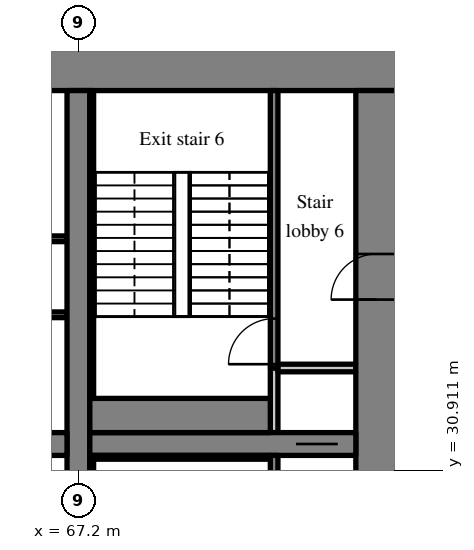
"""IFC4 building model, lengths in metres.
Left out: names, types, materials, properties, quantities, classifications, styles, units other than length and angle.
Written with IfcOpenShell. Run it as: python <this file> out.ifc"""

import sys

from ifc_helpers import new_model, si_unit, direction, frame, frame_2d, origin, place, context, subcontext, project, spatial, rectangle, extrude, source, transform, mapped, element, fill, save


model = new_model("IFC4")
c1 = context("Model", 3, precision=1e-05, world=origin(), true_north=direction((0.0, 1.0)))
c2 = subcontext(c1, "Body", "Model", "MODEL_VIEW")
j1 = project(units=[si_unit("LENGTHUNIT", "METRE"), si_unit("PLANEANGLEUNIT", "RADIAN")], contexts=[c1])
p1 = place(None, origin())
s1 = spatial("IfcSite", under=j1, at=p1, CompositionType="ELEMENT")
p2 = place(p1, origin())
s2 = spatial("IfcBuilding", under=s1, at=p2, CompositionType="ELEMENT")
p3 = place(p2, frame((0.0, 0.0, 27.8)))
s3 = spatial("IfcBuildingStorey", under=s2, at=p3, CompositionType="ELEMENT", Elevation=27.8)
m1 = source(origin(), c2, "Body", "SweptSolid", [
    extrude(rectangle(XDim=50.4, YDim=1.1, at=frame_2d((25.2, 0.0))), origin(), (0.0, 0.0, 1.0), 3.52),
])
p4 = place(p3, frame((25.2, 41.45, 0.0), z_axis=(0.0, 0.0, 1.0), x_axis=(1.0, 0.0, 0.0)))
e1 = element("IfcWall", 1, at=p4, inside=s3, PredefinedType="SHEAR", context=c2, shape_type="MappedRepresentation", body=[
    mapped(m1, transform((0.0, 0.0, 0.0), scale=1.0)),
])
m2 = source(origin(), c2, "Body", "SweptSolid", [
    extrude(rectangle(XDim=17.8, YDim=1.1, at=frame_2d((8.9, 0.0))), origin(), (0.0, 0.0, 1.0), 3.52),
])
p5 = place(p3, frame((75.05, 23.1, 0.0), z_axis=(0.0, 0.0, 1.0), x_axis=(0.0, 1.0, 0.0)))
e2 = element("IfcWall", 2, at=p5, inside=s3, PredefinedType="SHEAR", context=c2, shape_type="MappedRepresentation", body=[
    mapped(m2, transform((0.0, 0.0, 0.0), scale=1.0)),
])
m3 = source(origin(), c2, "Body", "SweptSolid", [
    extrude(rectangle(XDim=1.0, YDim=2.1, at=frame_2d((0.5, 1.05))), frame((0.0, 0.56, 0.0), z_axis=(0.0, -1.0, 0.0), x_axis=(1.0, 0.0, 0.0)), (0.0, 0.0, 1.0), 1.12),
])
p6 = place(p5, frame((2.4, 0.0, 0.0)))
e3 = element("IfcOpeningElement", 3, at=p6, cuts=e2, PredefinedType="OPENING", context=c2, shape_type="MappedRepresentation", body=[
    mapped(m3, transform((0.0, 0.0, 0.0), scale=1.0)),
])
m4 = source(origin(), c2, "Body", "SweptSolid", [
    extrude(rectangle(XDim=1.2, YDim=2.1, at=frame_2d((0.6, 1.05))), frame((0.0, 0.56, 0.0), z_axis=(0.0, -1.0, 0.0), x_axis=(1.0, 0.0, 0.0)), (0.0, 0.0, 1.0), 1.12),
])
p7 = place(p5, frame((12.3, 0.0, 0.0)))
e4 = element("IfcOpeningElement", 4, at=p7, cuts=e2, PredefinedType="OPENING", context=c2, shape_type="MappedRepresentation", body=[
    mapped(m4, transform((0.0, 0.0, 0.0), scale=1.0)),
])
m5 = source(origin(), c2, "Body", "SweptSolid", [
    extrude(rectangle(XDim=17.8, YDim=0.6, at=frame_2d((8.9, 0.0))), origin(), (0.0, 0.0, 1.0), 3.52),
])
p8 = place(p3, frame((67.2, 23.1, 0.0), z_axis=(0.0, 0.0, 1.0), x_axis=(0.0, 1.0, 0.0)))
e5 = element("IfcWall", 5, at=p8, inside=s3, PredefinedType="SHEAR", context=c2, shape_type="MappedRepresentation", body=[
    mapped(m5, transform((0.0, 0.0, 0.0), scale=1.0)),
])
m6 = source(origin(), c2, "Body", "SweptSolid", [
    extrude(rectangle(XDim=16.2, YDim=0.6, at=frame_2d((8.1, 0.0))), origin(), (0.0, 0.0, 1.0), 3.52),
])
p9 = place(p3, frame((50.7, 31.6, 0.0), z_axis=(0.0, 0.0, 1.0), x_axis=(1.0, 0.0, 0.0)))
e6 = element("IfcWall", 6, at=p9, inside=s3, PredefinedType="SHEAR", context=c2, shape_type="MappedRepresentation", body=[
    mapped(m6, transform((0.0, 0.0, 0.0), scale=1.0)),
])
m7 = source(origin(), c2, "Body", "SweptSolid", [
    extrude(rectangle(XDim=1.0, YDim=2.1, at=frame_2d((0.5, 1.05))), frame((0.0, 0.31, 0.0), z_axis=(0.0, -1.0, 0.0), x_axis=(1.0, 0.0, 0.0)), (0.0, 0.0, 1.0), 0.62),
])
p10 = place(p9, frame((0.55, 0.0, 0.0)))
e7 = element("IfcOpeningElement", 7, at=p10, cuts=e6, PredefinedType="OPENING", context=c2, shape_type="MappedRepresentation", body=[
    mapped(m7, transform((0.0, 0.0, 0.0), scale=1.0)),
])
m8 = source(origin(), c2, "Body", "SweptSolid", [
    extrude(rectangle(XDim=7.0, YDim=0.6, at=frame_2d((3.5, 0.0))), origin(), (0.0, 0.0, 1.0), 3.52),
])
p11 = place(p3, frame((67.5, 31.6, 0.0), z_axis=(0.0, 0.0, 1.0), x_axis=(1.0, 0.0, 0.0)))
e8 = element("IfcWall", 8, at=p11, inside=s3, PredefinedType="SHEAR", context=c2, shape_type="MappedRepresentation", body=[
    mapped(m8, transform((0.0, 0.0, 0.0), scale=1.0)),
])
m9 = source(origin(), c2, "Body", "SweptSolid", [
    extrude(rectangle(XDim=1.1, YDim=2.1, at=frame_2d((0.55, 1.05))), frame((0.0, 0.31, 0.0), z_axis=(0.0, -1.0, 0.0), x_axis=(1.0, 0.0, 0.0)), (0.0, 0.0, 1.0), 0.62),
])
p12 = place(p11, frame((5.425, 0.0, 0.0)))
e9 = element("IfcOpeningElement", 9, at=p12, cuts=e8, PredefinedType="OPENING", context=c2, shape_type="MappedRepresentation", body=[
    mapped(m9, transform((0.0, 0.0, 0.0), scale=1.0)),
])
m10 = source(origin(), c2, "Body", "SweptSolid", [
    extrude(rectangle(XDim=14.1, YDim=0.15, at=frame_2d((7.05, 0.0))), origin(), (0.0, 0.0, 1.0), 3.52),
])
p13 = place(p3, frame((66.9, 35.0, 0.0), z_axis=(0.0, 0.0, 1.0), x_axis=(-1.0, 0.0, 0.0)))
e10 = element("IfcWall", 10, at=p13, inside=s3, PredefinedType="PARTITIONING", context=c2, shape_type="MappedRepresentation", body=[
    mapped(m10, transform((0.0, 0.0, 0.0), scale=1.0)),
])
m11 = source(origin(), c2, "Body", "SweptSolid", [
    extrude(rectangle(XDim=0.9, YDim=2.1, at=frame_2d((0.45, 1.05))), frame((0.0, 0.085, 0.0), z_axis=(0.0, -1.0, 0.0), x_axis=(1.0, 0.0, 0.0)), (0.0, 0.0, 1.0), 0.17),
])
p14 = place(p13, frame((6.562, 0.0, 0.0)))
e11 = element("IfcOpeningElement", 11, at=p14, cuts=e10, PredefinedType="OPENING", context=c2, shape_type="MappedRepresentation", body=[
    mapped(m11, transform((0.0, 0.0, 0.0), scale=1.0)),
])
m12 = source(origin(), c2, "Body", "SweptSolid", [
    extrude(rectangle(XDim=16.2, YDim=0.15, at=frame_2d((8.1, 0.0))), origin(), (0.0, 0.0, 1.0), 3.52),
])
p15 = place(p3, frame((66.9, 37.0, 0.0), z_axis=(0.0, 0.0, 1.0), x_axis=(-1.0, 0.0, 0.0)))
e12 = element("IfcWall", 12, at=p15, inside=s3, PredefinedType="PARTITIONING", context=c2, shape_type="MappedRepresentation", body=[
    mapped(m12, transform((0.0, 0.0, 0.0), scale=1.0)),
])
p16 = place(p15, frame((3.195, 0.0, 0.0)))
e13 = element("IfcOpeningElement", 13, at=p16, cuts=e12, PredefinedType="OPENING", context=c2, shape_type="MappedRepresentation", body=[
    mapped(m11, transform((0.0, 0.0, 0.0), scale=1.0)),
])
p17 = place(p15, frame((8.055, 0.0, 0.0)))
e14 = element("IfcOpeningElement", 14, at=p17, cuts=e12, PredefinedType="OPENING", context=c2, shape_type="MappedRepresentation", body=[
    mapped(m11, transform((0.0, 0.0, 0.0), scale=1.0)),
])
p18 = place(p15, frame((11.295, 0.0, 0.0)))
e15 = element("IfcOpeningElement", 15, at=p18, cuts=e12, PredefinedType="OPENING", context=c2, shape_type="MappedRepresentation", body=[
    mapped(m11, transform((0.0, 0.0, 0.0), scale=1.0)),
])
p19 = place(p15, frame((14.535, 0.0, 0.0)))
e16 = element("IfcOpeningElement", 16, at=p19, cuts=e12, PredefinedType="OPENING", context=c2, shape_type="MappedRepresentation", body=[
    mapped(m11, transform((0.0, 0.0, 0.0), scale=1.0)),
])
m13 = source(origin(), c2, "Body", "SweptSolid", [
    extrude(rectangle(XDim=8.2, YDim=0.2, at=frame_2d((4.1, 0.0))), origin(), (0.0, 0.0, 1.0), 3.52),
])
p20 = place(p3, frame((72.35, 23.1, 0.0), z_axis=(0.0, 0.0, 1.0), x_axis=(0.0, 1.0, 0.0)))
e17 = element("IfcWall", 17, at=p20, inside=s3, PredefinedType="SOLIDWALL", context=c2, shape_type="MappedRepresentation", body=[
    mapped(m13, transform((0.0, 0.0, 0.0), scale=1.0)),
])
m14 = source(origin(), c2, "Body", "SweptSolid", [
    extrude(rectangle(XDim=1.2, YDim=2.1, at=frame_2d((0.6, 1.05))), frame((0.0, 0.11, 0.0), z_axis=(0.0, -1.0, 0.0), x_axis=(1.0, 0.0, 0.0)), (0.0, 0.0, 1.0), 0.22),
])
p21 = place(p20, frame((0.5, 0.0, 0.0)))
e18 = element("IfcOpeningElement", 18, at=p21, cuts=e17, PredefinedType="OPENING", context=c2, shape_type="MappedRepresentation", body=[
    mapped(m14, transform((0.0, 0.0, 0.0), scale=1.0)),
])
m15 = source(origin(), c2, "Body", "SweptSolid", [
    extrude(rectangle(XDim=1.7, YDim=0.2, at=frame_2d((0.85, 0.0))), origin(), (0.0, 0.0, 1.0), 3.52),
])
p22 = place(p3, frame((72.35, 31.9, 0.0), z_axis=(0.0, 0.0, 1.0), x_axis=(0.0, 1.0, 0.0)))
e19 = element("IfcWall", 19, at=p22, inside=s3, PredefinedType="SOLIDWALL", context=c2, shape_type="MappedRepresentation", body=[
    mapped(m15, transform((0.0, 0.0, 0.0), scale=1.0)),
])
m16 = source(origin(), c2, "Body", "SweptSolid", [
    extrude(rectangle(XDim=2.05, YDim=0.2, at=frame_2d((1.025, 0.0))), origin(), (0.0, 0.0, 1.0), 3.52),
])
p23 = place(p3, frame((72.45, 33.6, 0.0), z_axis=(0.0, 0.0, 1.0), x_axis=(1.0, 0.0, 0.0)))
e20 = element("IfcWall", 20, at=p23, inside=s3, PredefinedType="SOLIDWALL", context=c2, shape_type="MappedRepresentation", body=[
    mapped(m16, transform((0.0, 0.0, 0.0), scale=1.0)),
])
m17 = source(origin(), c2, "Body", "SweptSolid", [
    extrude(rectangle(XDim=7.3, YDim=0.2, at=frame_2d((3.65, 0.0))), origin(), (0.0, 0.0, 1.0), 3.52),
])
p24 = place(p3, frame((72.35, 33.6, 0.0), z_axis=(0.0, 0.0, 1.0), x_axis=(0.0, 1.0, 0.0)))
e21 = element("IfcWall", 21, at=p24, inside=s3, PredefinedType="SOLIDWALL", context=c2, shape_type="MappedRepresentation", body=[
    mapped(m17, transform((0.0, 0.0, 0.0), scale=1.0)),
])
p25 = place(p24, frame((0.1, 0.0, 0.0)))
e22 = element("IfcOpeningElement", 22, at=p25, cuts=e21, PredefinedType="OPENING", context=c2, shape_type="MappedRepresentation", body=[
    mapped(m14, transform((0.0, 0.0, 0.0), scale=1.0)),
])
m18 = source(origin(), c2, "Body", "SweptSolid", [
    extrude(rectangle(XDim=4.75, YDim=0.1, at=frame_2d((2.375, 0.0))), origin(), (0.0, 0.0, 1.0), 3.52),
])
p26 = place(p3, frame((67.5, 31.25, 0.0), z_axis=(0.0, 0.0, 1.0), x_axis=(1.0, 0.0, 0.0)))
e23 = element("IfcWall", 23, at=p26, inside=s3, PredefinedType="SOLIDWALL", context=c2, shape_type="MappedRepresentation", body=[
    mapped(m18, transform((0.0, 0.0, 0.0), scale=1.0)),
])
m19 = source(origin(), c2, "Body", "SweptSolid", [
    extrude(rectangle(XDim=8.1, YDim=0.1, at=frame_2d((4.05, 0.0))), origin(), (0.0, 0.0, 1.0), 3.52),
])
p27 = place(p3, frame((67.55, 23.1, 0.0), z_axis=(0.0, 0.0, 1.0), x_axis=(0.0, 1.0, 0.0)))
e24 = element("IfcWall", 24, at=p27, inside=s3, PredefinedType="SOLIDWALL", context=c2, shape_type="MappedRepresentation", body=[
    mapped(m19, transform((0.0, 0.0, 0.0), scale=1.0)),
])
m20 = source(origin(), c2, "Body", "SweptSolid", [
    extrude(rectangle(XDim=4.75, YDim=0.9, at=frame_2d((2.375, 0.0))), origin(), (0.0, 0.0, 1.0), 3.52),
])
p28 = place(p3, frame((67.5, 32.35, 0.0), z_axis=(0.0, 0.0, 1.0), x_axis=(1.0, 0.0, 0.0)))
e25 = element("IfcWall", 25, at=p28, inside=s3, PredefinedType="SOLIDWALL", context=c2, shape_type="MappedRepresentation", body=[
    mapped(m20, transform((0.0, 0.0, 0.0), scale=1.0)),
])
p29 = place(p3, frame((67.55, 32.8, 0.0), z_axis=(0.0, 0.0, 1.0), x_axis=(0.0, 1.0, 0.0)))
e26 = element("IfcWall", 26, at=p29, inside=s3, PredefinedType="SOLIDWALL", context=c2, shape_type="MappedRepresentation", body=[
    mapped(m19, transform((0.0, 0.0, 0.0), scale=1.0)),
])
m21 = source(origin(), c2, "Body", "SweptSolid", [
    extrude(rectangle(XDim=1.1, YDim=2.1, at=frame_2d((0.55, 1.05))), frame((0.0, 0.025, 0.0), z_axis=(0.0, -1.0, 0.0), x_axis=(1.0, 0.0, 0.0)), (0.0, 0.0, 1.0), 0.05),
])
p30 = place(p12, origin())
e27 = element("IfcDoor", 27, at=p30, inside=s3, OperationType="SLIDING_TO_RIGHT", PredefinedType="DOOR", context=c2, shape_type="MappedRepresentation", body=[
    mapped(m21, transform((0.0, 0.0, 0.0), scale=1.0)),
])
fill(e9, e27)
m22 = source(origin(), c2, "Body", "SweptSolid", [
    extrude(rectangle(XDim=1.2, YDim=2.1, at=frame_2d((0.6, 1.05))), frame((0.0, 0.025, 0.0), z_axis=(0.0, -1.0, 0.0), x_axis=(1.0, 0.0, 0.0)), (0.0, 0.0, 1.0), 0.05),
])
p31 = place(p25, origin())
e28 = element("IfcDoor", 28, at=p31, inside=s3, OperationType="SINGLE_SWING_LEFT", PredefinedType="DOOR", context=c2, shape_type="MappedRepresentation", body=[
    mapped(m22, transform((0.0, 0.0, 0.0), scale=1.0)),
])
fill(e22, e28)
p32 = place(p7, origin())
e29 = element("IfcDoor", 29, at=p32, inside=s3, OperationType="SINGLE_SWING_LEFT", PredefinedType="DOOR", context=c2, shape_type="MappedRepresentation", body=[
    mapped(m22, transform((0.0, 0.0, 0.0), scale=1.0)),
])
fill(e4, e29)
save(model, sys.argv[1])
